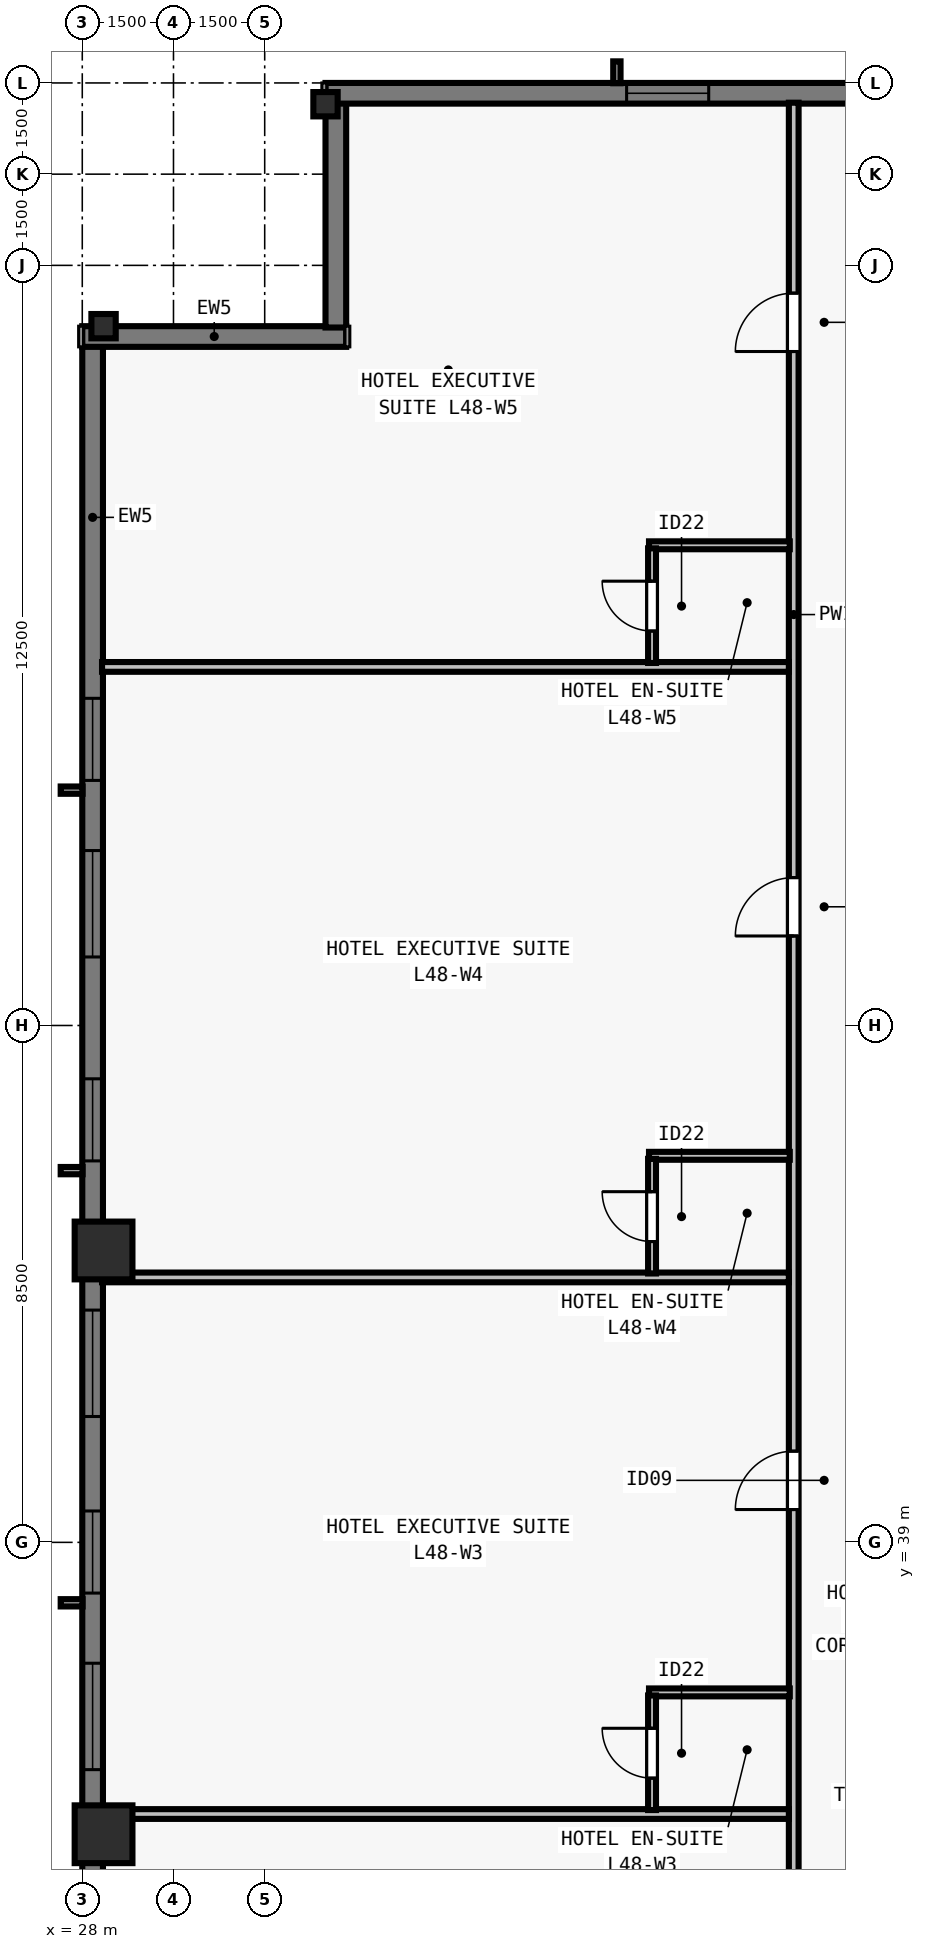
"""IFC4 building model, lengths in metres.
Left out: names, types, materials, properties, quantities, classifications, styles, units other than length and angle.
Written with IfcOpenShell. Run it as: python <this file> out.ifc"""

import sys

from ifc_helpers import new_model, si_unit, direction, frame, frame_2d, origin, origin_2d, place, context, subcontext, project, spatial, rectangle, i_section, extrude, element, fill, save


model = new_model("IFC4")
c1 = context("Model", 3, precision=1e-05, world=origin(), true_north=direction((0.0, 1.0)))
c2 = subcontext(c1, "Body", "Model", "MODEL_VIEW")
j1 = project(units=[si_unit("LENGTHUNIT", "METRE"), si_unit("PLANEANGLEUNIT", "RADIAN")], contexts=[c1])
p1 = place(None, origin())
s1 = spatial("IfcSite", under=j1, at=p1, CompositionType="ELEMENT")
p2 = place(p1, origin())
s2 = spatial("IfcBuilding", under=s1, at=p2, CompositionType="ELEMENT")
p3 = place(p2, frame((0.0, 0.0, 176.0)))
s3 = spatial("IfcBuildingStorey", under=s2, at=p3, CompositionType="ELEMENT", Elevation=176.0)
for number, where, z_axis, x_axis in (
    (1, (32.0, 62.65, 0.0), (0.0, 0.0, 1.0), (1.0, 0.0, 0.0)),
    (2, (28.35, 59.0, 0.0), (0.0, 0.0, 1.0), (0.0, 1.0, 0.0)),
):
    element("IfcColumn", number, at=place(p3, frame(where, z_axis=z_axis, x_axis=x_axis)), inside=s3, PredefinedType="COLUMN", context=c2, shape_type="SweptSolid", body=[
        extrude(i_section(OverallWidth=0.4, OverallDepth=0.4, WebThickness=0.022, FlangeThickness=0.036, at=origin_2d()), origin(), (0.0, 0.0, 1.0), 3.5),
    ])
for number, where, z_axis, x_axis in (
    (3, (28.35, 43.8, 0.0), (0.0, 0.0, 1.0), (0.0, 1.0, 0.0)),
    (4, (28.35, 34.2, 0.0), (0.0, 0.0, 1.0), (0.0, 1.0, 0.0)),
):
    element("IfcColumn", number, at=place(p3, frame(where, z_axis=z_axis, x_axis=x_axis)), inside=s3, PredefinedType="COLUMN", context=c2, shape_type="SweptSolid", body=[
        extrude(rectangle(XDim=0.95, YDim=0.95, at=origin_2d()), origin(), (0.0, 0.0, 1.0), 3.5),
    ])
p4 = place(p3, frame((28.17, 19.0, 0.0), z_axis=(0.0, 0.0, 1.0), x_axis=(0.0, 1.0, 0.0)))
e5 = element("IfcWall", 5, at=p4, inside=s3, PredefinedType="SOLIDWALL", context=c2, shape_type="SweptSolid", body=[
    extrude(rectangle(XDim=39.682, YDim=0.34, at=frame_2d((19.841, 0.0))), origin(), (0.0, 0.0, 1.0), 3.28),
])
p5 = place(p4, frame((5.802, 0.0, 0.8)))
e6 = element("IfcOpeningElement", 6, at=p5, cuts=e5, PredefinedType="OPENING", context=c2, shape_type="SweptSolid", body=[
    extrude(rectangle(XDim=1.35, YDim=1.66, at=frame_2d((0.675, 0.83))), frame((0.0, 0.18, 0.0), z_axis=(0.0, -1.0, 0.0), x_axis=(1.0, 0.0, 0.0)), (0.0, 0.0, 1.0), 0.36),
])
p6 = place(p4, frame((8.305, 0.0, 0.8)))
e7 = element("IfcOpeningElement", 7, at=p6, cuts=e5, PredefinedType="OPENING", context=c2, shape_type="SweptSolid", body=[
    extrude(rectangle(XDim=1.75, YDim=1.66, at=frame_2d((0.875, 0.83))), frame((0.0, 0.18, 0.0), z_axis=(0.0, -1.0, 0.0), x_axis=(1.0, 0.0, 0.0)), (0.0, 0.0, 1.0), 0.36),
])
p7 = place(p4, frame((12.059, 0.0, 0.8)))
e8 = element("IfcOpeningElement", 8, at=p7, cuts=e5, PredefinedType="OPENING", context=c2, shape_type="SweptSolid", body=[
    extrude(rectangle(XDim=1.35, YDim=1.66, at=frame_2d((0.675, 0.83))), frame((0.0, 0.18, 0.0), z_axis=(0.0, -1.0, 0.0), x_axis=(1.0, 0.0, 0.0)), (0.0, 0.0, 1.0), 0.36),
])
p8 = place(p4, frame((16.262, 0.0, 0.8)))
e9 = element("IfcOpeningElement", 9, at=p8, cuts=e5, PredefinedType="OPENING", context=c2, shape_type="SweptSolid", body=[
    extrude(rectangle(XDim=1.75, YDim=1.66, at=frame_2d((0.875, 0.83))), frame((0.0, 0.18, 0.0), z_axis=(0.0, -1.0, 0.0), x_axis=(1.0, 0.0, 0.0)), (0.0, 0.0, 1.0), 0.36),
])
p9 = place(p4, frame((19.166, 0.0, 0.8)))
e10 = element("IfcOpeningElement", 10, at=p9, cuts=e5, PredefinedType="OPENING", context=c2, shape_type="SweptSolid", body=[
    extrude(rectangle(XDim=1.35, YDim=1.66, at=frame_2d((0.675, 0.83))), frame((0.0, 0.18, 0.0), z_axis=(0.0, -1.0, 0.0), x_axis=(1.0, 0.0, 0.0)), (0.0, 0.0, 1.0), 0.36),
])
p10 = place(p4, frame((22.07, 0.0, 0.8)))
e11 = element("IfcOpeningElement", 11, at=p10, cuts=e5, PredefinedType="OPENING", context=c2, shape_type="SweptSolid", body=[
    extrude(rectangle(XDim=1.75, YDim=1.66, at=frame_2d((0.875, 0.83))), frame((0.0, 0.18, 0.0), z_axis=(0.0, -1.0, 0.0), x_axis=(1.0, 0.0, 0.0)), (0.0, 0.0, 1.0), 0.36),
])
p11 = place(p4, frame((26.273, 0.0, 0.8)))
e12 = element("IfcOpeningElement", 12, at=p11, cuts=e5, PredefinedType="OPENING", context=c2, shape_type="SweptSolid", body=[
    extrude(rectangle(XDim=1.35, YDim=1.66, at=frame_2d((0.675, 0.83))), frame((0.0, 0.18, 0.0), z_axis=(0.0, -1.0, 0.0), x_axis=(1.0, 0.0, 0.0)), (0.0, 0.0, 1.0), 0.36),
])
p12 = place(p4, frame((29.627, 0.0, 0.8)))
e13 = element("IfcOpeningElement", 13, at=p12, cuts=e5, PredefinedType="OPENING", context=c2, shape_type="SweptSolid", body=[
    extrude(rectangle(XDim=1.75, YDim=1.66, at=frame_2d((0.875, 0.83))), frame((0.0, 0.18, 0.0), z_axis=(0.0, -1.0, 0.0), x_axis=(1.0, 0.0, 0.0)), (0.0, 0.0, 1.0), 0.36),
])
p13 = place(p4, frame((32.53, 0.0, 0.8)))
e14 = element("IfcOpeningElement", 14, at=p13, cuts=e5, PredefinedType="OPENING", context=c2, shape_type="SweptSolid", body=[
    extrude(rectangle(XDim=1.35, YDim=1.66, at=frame_2d((0.675, 0.83))), frame((0.0, 0.18, 0.0), z_axis=(0.0, -1.0, 0.0), x_axis=(1.0, 0.0, 0.0)), (0.0, 0.0, 1.0), 0.36),
])
p14 = place(p3, frame((28.0, 58.83, 0.0), z_axis=(0.0, 0.0, 1.0), x_axis=(1.0, 0.0, 0.0)))
e15 = element("IfcWall", 15, at=p14, inside=s3, PredefinedType="SOLIDWALL", context=c2, shape_type="SweptSolid", body=[
    extrude(rectangle(XDim=4.34, YDim=0.34, at=frame_2d((2.17, 0.0))), origin(), (0.0, 0.0, 1.0), 3.28),
])
p15 = place(p3, frame((32.17, 58.978, 0.0), z_axis=(0.0, 0.0, 1.0), x_axis=(0.0, 1.0, 0.0)))
e16 = element("IfcWall", 16, at=p15, inside=s3, PredefinedType="SOLIDWALL", context=c2, shape_type="SweptSolid", body=[
    extrude(rectangle(XDim=3.704, YDim=0.34, at=frame_2d((1.852, 0.0))), origin(), (0.0, 0.0, 1.0), 3.28),
])
p16 = place(p3, frame((32.0, 62.83, 0.0), z_axis=(0.0, 0.0, 1.0), x_axis=(1.0, 0.0, 0.0)))
e17 = element("IfcWall", 17, at=p16, inside=s3, PredefinedType="SOLIDWALL", context=c2, shape_type="SweptSolid", body=[
    extrude(rectangle(XDim=39.682, YDim=0.34, at=frame_2d((19.841, 0.0))), origin(), (0.0, 0.0, 1.0), 3.28),
])
p17 = place(p16, frame((4.952, 0.0, 0.8)))
e18 = element("IfcOpeningElement", 18, at=p17, cuts=e17, PredefinedType="OPENING", context=c2, shape_type="SweptSolid", body=[
    extrude(rectangle(XDim=1.35, YDim=1.66, at=frame_2d((0.675, 0.83))), frame((0.0, 0.18, 0.0), z_axis=(0.0, -1.0, 0.0), x_axis=(1.0, 0.0, 0.0)), (0.0, 0.0, 1.0), 0.36),
])
p18 = place(p16, frame((12.059, 0.0, 0.8)))
e19 = element("IfcOpeningElement", 19, at=p18, cuts=e17, PredefinedType="OPENING", context=c2, shape_type="SweptSolid", body=[
    extrude(rectangle(XDim=1.35, YDim=1.66, at=frame_2d((0.675, 0.83))), frame((0.0, 0.18, 0.0), z_axis=(0.0, -1.0, 0.0), x_axis=(1.0, 0.0, 0.0)), (0.0, 0.0, 1.0), 0.36),
])
p19 = place(p16, frame((19.166, 0.0, 0.8)))
e20 = element("IfcOpeningElement", 20, at=p19, cuts=e17, PredefinedType="OPENING", context=c2, shape_type="SweptSolid", body=[
    extrude(rectangle(XDim=1.35, YDim=1.66, at=frame_2d((0.675, 0.83))), frame((0.0, 0.18, 0.0), z_axis=(0.0, -1.0, 0.0), x_axis=(1.0, 0.0, 0.0)), (0.0, 0.0, 1.0), 0.36),
])
p20 = place(p16, frame((21.27, 0.0, 0.8)))
e21 = element("IfcOpeningElement", 21, at=p20, cuts=e17, PredefinedType="OPENING", context=c2, shape_type="SweptSolid", body=[
    extrude(rectangle(XDim=1.75, YDim=1.66, at=frame_2d((0.875, 0.83))), frame((0.0, 0.18, 0.0), z_axis=(0.0, -1.0, 0.0), x_axis=(1.0, 0.0, 0.0)), (0.0, 0.0, 1.0), 0.36),
])
p21 = place(p16, frame((26.273, 0.0, 0.8)))
e22 = element("IfcOpeningElement", 22, at=p21, cuts=e17, PredefinedType="OPENING", context=c2, shape_type="SweptSolid", body=[
    extrude(rectangle(XDim=1.35, YDim=1.66, at=frame_2d((0.675, 0.83))), frame((0.0, 0.18, 0.0), z_axis=(0.0, -1.0, 0.0), x_axis=(1.0, 0.0, 0.0)), (0.0, 0.0, 1.0), 0.36),
])
p22 = place(p16, frame((29.627, 0.0, 0.8)))
e23 = element("IfcOpeningElement", 23, at=p22, cuts=e17, PredefinedType="OPENING", context=c2, shape_type="SweptSolid", body=[
    extrude(rectangle(XDim=1.75, YDim=1.66, at=frame_2d((0.875, 0.83))), frame((0.0, 0.18, 0.0), z_axis=(0.0, -1.0, 0.0), x_axis=(1.0, 0.0, 0.0)), (0.0, 0.0, 1.0), 0.36),
])
p23 = place(p16, frame((34.47, 0.0, 0.8)))
e24 = element("IfcOpeningElement", 24, at=p23, cuts=e17, PredefinedType="OPENING", context=c2, shape_type="SweptSolid", body=[
    extrude(rectangle(XDim=0.9, YDim=1.66, at=frame_2d((0.45, 0.83))), frame((0.0, 0.18, 0.0), z_axis=(0.0, -1.0, 0.0), x_axis=(1.0, 0.0, 0.0)), (0.0, 0.0, 1.0), 0.36),
])
p24 = place(p3, frame((39.7, 15.325, 0.0), z_axis=(0.0, 0.0, 1.0), x_axis=(0.0, 1.0, 0.0)))
e25 = element("IfcWall", 25, at=p24, inside=s3, PredefinedType="PARTITIONING", context=c2, shape_type="SweptSolid", body=[
    extrude(rectangle(XDim=47.35, YDim=0.16, at=frame_2d((23.675, 0.0))), origin(), (0.0, 0.0, 1.0), 2.555),
])
p25 = place(p24, frame((5.451, 0.0, 0.0)))
e26 = element("IfcOpeningElement", 26, at=p25, cuts=e25, PredefinedType="OPENING", context=c2, shape_type="SweptSolid", body=[
    extrude(rectangle(XDim=0.96, YDim=2.15, at=frame_2d((0.48, 1.075))), frame((0.0, 0.09, 0.0), z_axis=(0.0, -1.0, 0.0), x_axis=(1.0, 0.0, 0.0)), (0.0, 0.0, 1.0), 0.18),
])
p26 = place(p24, frame((14.783, 0.0, 0.0)))
e27 = element("IfcOpeningElement", 27, at=p26, cuts=e25, PredefinedType="OPENING", context=c2, shape_type="SweptSolid", body=[
    extrude(rectangle(XDim=0.96, YDim=2.15, at=frame_2d((0.48, 1.075))), frame((0.0, 0.09, 0.0), z_axis=(0.0, -1.0, 0.0), x_axis=(1.0, 0.0, 0.0)), (0.0, 0.0, 1.0), 0.18),
])
p27 = place(p24, frame((24.215, 0.0, 0.0)))
e28 = element("IfcOpeningElement", 28, at=p27, cuts=e25, PredefinedType="OPENING", context=c2, shape_type="SweptSolid", body=[
    extrude(rectangle(XDim=0.96, YDim=2.15, at=frame_2d((0.48, 1.075))), frame((0.0, 0.09, 0.0), z_axis=(0.0, -1.0, 0.0), x_axis=(1.0, 0.0, 0.0)), (0.0, 0.0, 1.0), 0.18),
])
p28 = place(p24, frame((33.647, 0.0, 0.0)))
e29 = element("IfcOpeningElement", 29, at=p28, cuts=e25, PredefinedType="OPENING", context=c2, shape_type="SweptSolid", body=[
    extrude(rectangle(XDim=0.96, YDim=2.15, at=frame_2d((0.48, 1.075))), frame((0.0, 0.09, 0.0), z_axis=(0.0, -1.0, 0.0), x_axis=(1.0, 0.0, 0.0)), (0.0, 0.0, 1.0), 0.18),
])
p29 = place(p24, frame((43.258, 0.0, 0.0)))
e30 = element("IfcOpeningElement", 30, at=p29, cuts=e25, PredefinedType="OPENING", context=c2, shape_type="SweptSolid", body=[
    extrude(rectangle(XDim=0.96, YDim=2.15, at=frame_2d((0.48, 1.075))), frame((0.0, 0.09, 0.0), z_axis=(0.0, -1.0, 0.0), x_axis=(1.0, 0.0, 0.0)), (0.0, 0.0, 1.0), 0.18),
])
p30 = place(p3, frame((28.325, 34.533, 0.0), z_axis=(0.0, 0.0, 1.0), x_axis=(1.0, 0.0, 0.0)))
e31 = element("IfcWall", 31, at=p30, inside=s3, PredefinedType="PARTITIONING", context=c2, shape_type="SweptSolid", body=[
    extrude(rectangle(XDim=11.295, YDim=0.16, at=frame_2d((5.647, 0.0))), origin(), (0.0, 0.0, 1.0), 2.896),
])
p31 = place(p3, frame((37.32, 36.533, 0.0), z_axis=(0.0, 0.0, 1.0), x_axis=(1.0, 0.0, 0.0)))
e32 = element("IfcWall", 32, at=p31, inside=s3, PredefinedType="PLUMBINGWALL", context=c2, shape_type="SweptSolid", body=[
    extrude(rectangle(XDim=2.315, YDim=0.13, at=frame_2d((1.157, 0.0))), origin(), (0.0, 0.0, 1.0), 3.28),
])
p32 = place(p3, frame((37.37, 34.598, 0.0), z_axis=(0.0, 0.0, 1.0), x_axis=(0.0, 1.0, 0.0)))
e33 = element("IfcWall", 33, at=p32, inside=s3, PredefinedType="PLUMBINGWALL", context=c2, shape_type="SweptSolid", body=[
    extrude(rectangle(XDim=1.885, YDim=0.13, at=frame_2d((0.942, 0.0))), origin(), (0.0, 0.0, 1.0), 3.28),
])
p33 = place(p32, frame((0.525, 0.0, 0.0)))
e34 = element("IfcOpeningElement", 34, at=p33, cuts=e33, PredefinedType="OPENING", context=c2, shape_type="SweptSolid", body=[
    extrude(rectangle(XDim=0.82, YDim=2.1, at=frame_2d((0.41, 1.05))), frame((0.0, 0.075, 0.0), z_axis=(0.0, -1.0, 0.0), x_axis=(1.0, 0.0, 0.0)), (0.0, 0.0, 1.0), 0.15),
])
p34 = place(p3, frame((28.325, 43.357, 0.0), z_axis=(0.0, 0.0, 1.0), x_axis=(1.0, 0.0, 0.0)))
e35 = element("IfcWall", 35, at=p34, inside=s3, PredefinedType="PARTITIONING", context=c2, shape_type="SweptSolid", body=[
    extrude(rectangle(XDim=11.295, YDim=0.16, at=frame_2d((5.647, 0.0))), origin(), (0.0, 0.0, 1.0), 2.896),
])
p35 = place(p3, frame((37.32, 45.357, 0.0), z_axis=(0.0, 0.0, 1.0), x_axis=(1.0, 0.0, 0.0)))
e36 = element("IfcWall", 36, at=p35, inside=s3, PredefinedType="PLUMBINGWALL", context=c2, shape_type="SweptSolid", body=[
    extrude(rectangle(XDim=2.315, YDim=0.13, at=frame_2d((1.157, 0.0))), origin(), (0.0, 0.0, 1.0), 3.28),
])
p36 = place(p3, frame((37.37, 43.422, 0.0), z_axis=(0.0, 0.0, 1.0), x_axis=(0.0, 1.0, 0.0)))
e37 = element("IfcWall", 37, at=p36, inside=s3, PredefinedType="PLUMBINGWALL", context=c2, shape_type="SweptSolid", body=[
    extrude(rectangle(XDim=1.885, YDim=0.13, at=frame_2d((0.942, 0.0))), origin(), (0.0, 0.0, 1.0), 3.28),
])
p37 = place(p36, frame((0.525, 0.0, 0.0)))
e38 = element("IfcOpeningElement", 38, at=p37, cuts=e37, PredefinedType="OPENING", context=c2, shape_type="SweptSolid", body=[
    extrude(rectangle(XDim=0.82, YDim=2.1, at=frame_2d((0.41, 1.05))), frame((0.0, 0.075, 0.0), z_axis=(0.0, -1.0, 0.0), x_axis=(1.0, 0.0, 0.0)), (0.0, 0.0, 1.0), 0.15),
])
p38 = place(p3, frame((28.325, 53.396, 0.0), z_axis=(0.0, 0.0, 1.0), x_axis=(1.0, 0.0, 0.0)))
e39 = element("IfcWall", 39, at=p38, inside=s3, PredefinedType="PARTITIONING", context=c2, shape_type="SweptSolid", body=[
    extrude(rectangle(XDim=11.295, YDim=0.16, at=frame_2d((5.647, 0.0))), origin(), (0.0, 0.0, 1.0), 2.896),
])
p39 = place(p3, frame((37.32, 55.396, 0.0), z_axis=(0.0, 0.0, 1.0), x_axis=(1.0, 0.0, 0.0)))
e40 = element("IfcWall", 40, at=p39, inside=s3, PredefinedType="PLUMBINGWALL", context=c2, shape_type="SweptSolid", body=[
    extrude(rectangle(XDim=2.315, YDim=0.13, at=frame_2d((1.157, 0.0))), origin(), (0.0, 0.0, 1.0), 3.28),
])
p40 = place(p3, frame((37.37, 53.462, 0.0), z_axis=(0.0, 0.0, 1.0), x_axis=(0.0, 1.0, 0.0)))
e41 = element("IfcWall", 41, at=p40, inside=s3, PredefinedType="PLUMBINGWALL", context=c2, shape_type="SweptSolid", body=[
    extrude(rectangle(XDim=1.885, YDim=0.13, at=frame_2d((0.942, 0.0))), origin(), (0.0, 0.0, 1.0), 3.28),
])
p41 = place(p40, frame((0.525, 0.0, 0.0)))
e42 = element("IfcOpeningElement", 42, at=p41, cuts=e41, PredefinedType="OPENING", context=c2, shape_type="SweptSolid", body=[
    extrude(rectangle(XDim=0.82, YDim=2.1, at=frame_2d((0.41, 1.05))), frame((0.0, 0.075, 0.0), z_axis=(0.0, -1.0, 0.0), x_axis=(1.0, 0.0, 0.0)), (0.0, 0.0, 1.0), 0.15),
])
p42 = place(p8, origin())
e43 = element("IfcWindow", 43, at=p42, inside=s3, PartitioningType="SINGLE_PANEL", PredefinedType="WINDOW", context=c2, shape_type="SweptSolid", body=[
    extrude(rectangle(XDim=1.75, YDim=1.66, at=frame_2d((0.875, 0.83))), frame((0.0, -0.05, 0.0), z_axis=(0.0, -1.0, 0.0), x_axis=(1.0, 0.0, 0.0)), (0.0, 0.0, 1.0), 0.06),
])
fill(e9, e43)
p43 = place(p9, origin())
e44 = element("IfcWindow", 44, at=p43, inside=s3, PartitioningType="SINGLE_PANEL", PredefinedType="WINDOW", context=c2, shape_type="SweptSolid", body=[
    extrude(rectangle(XDim=1.35, YDim=1.66, at=frame_2d((0.675, 0.83))), frame((0.0, -0.05, 0.0), z_axis=(0.0, -1.0, 0.0), x_axis=(1.0, 0.0, 0.0)), (0.0, 0.0, 1.0), 0.06),
])
fill(e10, e44)
p44 = place(p10, origin())
e45 = element("IfcWindow", 45, at=p44, inside=s3, PartitioningType="SINGLE_PANEL", PredefinedType="WINDOW", context=c2, shape_type="SweptSolid", body=[
    extrude(rectangle(XDim=1.75, YDim=1.66, at=frame_2d((0.875, 0.83))), frame((0.0, -0.05, 0.0), z_axis=(0.0, -1.0, 0.0), x_axis=(1.0, 0.0, 0.0)), (0.0, 0.0, 1.0), 0.06),
])
fill(e11, e45)
p45 = place(p11, origin())
e46 = element("IfcWindow", 46, at=p45, inside=s3, PartitioningType="SINGLE_PANEL", PredefinedType="WINDOW", context=c2, shape_type="SweptSolid", body=[
    extrude(rectangle(XDim=1.35, YDim=1.66, at=frame_2d((0.675, 0.83))), frame((0.0, -0.05, 0.0), z_axis=(0.0, -1.0, 0.0), x_axis=(1.0, 0.0, 0.0)), (0.0, 0.0, 1.0), 0.06),
])
fill(e12, e46)
p46 = place(p12, origin())
e47 = element("IfcWindow", 47, at=p46, inside=s3, PartitioningType="SINGLE_PANEL", PredefinedType="WINDOW", context=c2, shape_type="SweptSolid", body=[
    extrude(rectangle(XDim=1.75, YDim=1.66, at=frame_2d((0.875, 0.83))), frame((0.0, -0.05, 0.0), z_axis=(0.0, -1.0, 0.0), x_axis=(1.0, 0.0, 0.0)), (0.0, 0.0, 1.0), 0.06),
])
fill(e13, e47)
p47 = place(p13, origin())
e48 = element("IfcWindow", 48, at=p47, inside=s3, PartitioningType="SINGLE_PANEL", PredefinedType="WINDOW", context=c2, shape_type="SweptSolid", body=[
    extrude(rectangle(XDim=1.35, YDim=1.66, at=frame_2d((0.675, 0.83))), frame((0.0, -0.05, 0.0), z_axis=(0.0, -1.0, 0.0), x_axis=(1.0, 0.0, 0.0)), (0.0, 0.0, 1.0), 0.06),
])
fill(e14, e48)
p48 = place(p17, origin())
e49 = element("IfcWindow", 49, at=p48, inside=s3, PartitioningType="SINGLE_PANEL", PredefinedType="WINDOW", context=c2, shape_type="SweptSolid", body=[
    extrude(rectangle(XDim=1.35, YDim=1.66, at=frame_2d((0.675, 0.83))), frame((0.0, -0.05, 0.0), z_axis=(0.0, -1.0, 0.0), x_axis=(1.0, 0.0, 0.0)), (0.0, 0.0, 1.0), 0.06),
])
fill(e18, e49)
p49 = place(p33, origin())
e50 = element("IfcDoor", 50, at=p49, inside=s3, OperationType="SINGLE_SWING_RIGHT", PredefinedType="DOOR", context=c2, shape_type="SweptSolid", body=[
    extrude(rectangle(XDim=0.82, YDim=2.1, at=frame_2d((0.41, 1.05))), frame((0.0, 0.025, 0.0), z_axis=(0.0, -1.0, 0.0), x_axis=(1.0, 0.0, 0.0)), (0.0, 0.0, 1.0), 0.05),
])
fill(e34, e50)
p50 = place(p27, origin())
e51 = element("IfcDoor", 51, at=p50, inside=s3, OperationType="SINGLE_SWING_LEFT", PredefinedType="DOOR", context=c2, shape_type="SweptSolid", body=[
    extrude(rectangle(XDim=0.96, YDim=2.15, at=frame_2d((0.48, 1.075))), frame((0.0, 0.025, 0.0), z_axis=(0.0, -1.0, 0.0), x_axis=(1.0, 0.0, 0.0)), (0.0, 0.0, 1.0), 0.05),
])
fill(e28, e51)
p51 = place(p37, origin())
e52 = element("IfcDoor", 52, at=p51, inside=s3, OperationType="SINGLE_SWING_RIGHT", PredefinedType="DOOR", context=c2, shape_type="SweptSolid", body=[
    extrude(rectangle(XDim=0.82, YDim=2.1, at=frame_2d((0.41, 1.05))), frame((0.0, 0.025, 0.0), z_axis=(0.0, -1.0, 0.0), x_axis=(1.0, 0.0, 0.0)), (0.0, 0.0, 1.0), 0.05),
])
fill(e38, e52)
p52 = place(p28, origin())
e53 = element("IfcDoor", 53, at=p52, inside=s3, OperationType="SINGLE_SWING_LEFT", PredefinedType="DOOR", context=c2, shape_type="SweptSolid", body=[
    extrude(rectangle(XDim=0.96, YDim=2.15, at=frame_2d((0.48, 1.075))), frame((0.0, 0.025, 0.0), z_axis=(0.0, -1.0, 0.0), x_axis=(1.0, 0.0, 0.0)), (0.0, 0.0, 1.0), 0.05),
])
fill(e29, e53)
p53 = place(p41, origin())
e54 = element("IfcDoor", 54, at=p53, inside=s3, OperationType="SINGLE_SWING_RIGHT", PredefinedType="DOOR", context=c2, shape_type="SweptSolid", body=[
    extrude(rectangle(XDim=0.82, YDim=2.1, at=frame_2d((0.41, 1.05))), frame((0.0, 0.025, 0.0), z_axis=(0.0, -1.0, 0.0), x_axis=(1.0, 0.0, 0.0)), (0.0, 0.0, 1.0), 0.05),
])
fill(e42, e54)
p54 = place(p29, origin())
e55 = element("IfcDoor", 55, at=p54, inside=s3, OperationType="SINGLE_SWING_LEFT", PredefinedType="DOOR", context=c2, shape_type="SweptSolid", body=[
    extrude(rectangle(XDim=0.96, YDim=2.15, at=frame_2d((0.48, 1.075))), frame((0.0, 0.025, 0.0), z_axis=(0.0, -1.0, 0.0), x_axis=(1.0, 0.0, 0.0)), (0.0, 0.0, 1.0), 0.05),
])
fill(e30, e55)
save(model, sys.argv[1])
